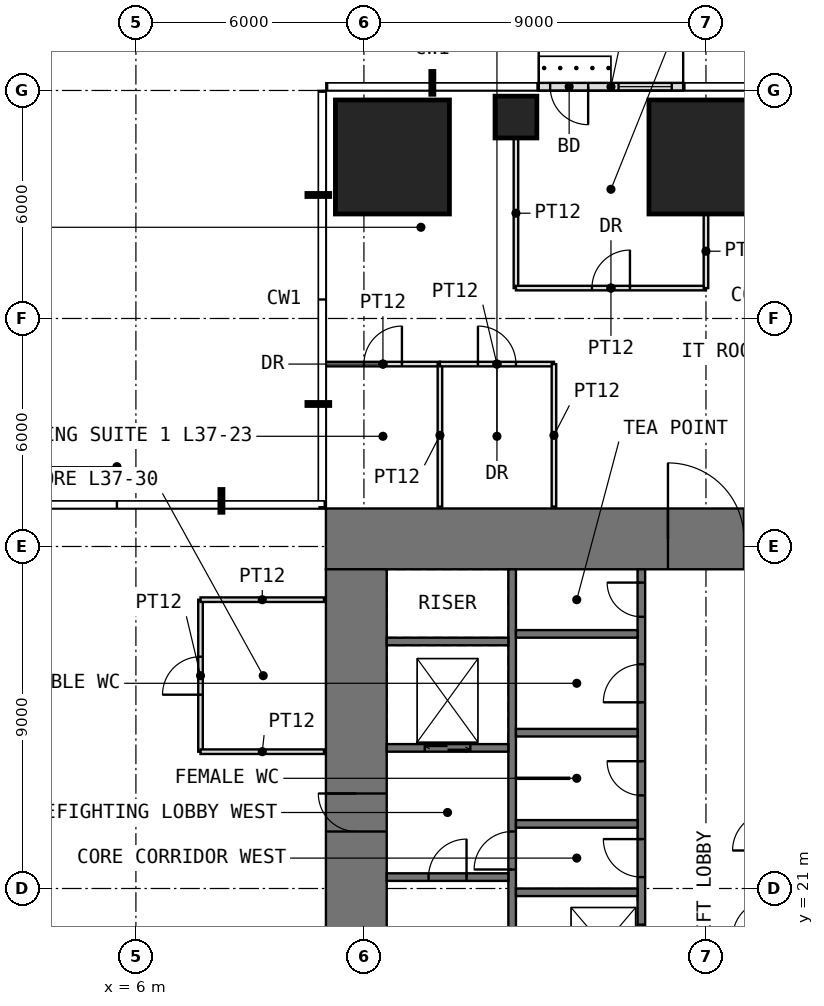
"""IFC4 building model, lengths in metres.
Left out: names, types, materials, properties, quantities, classifications, styles, units other than length and angle.
Written with IfcOpenShell. Run it as: python <this file> out.ifc"""

import sys

from ifc_helpers import new_model, si_unit, direction, frame, frame_2d, origin, origin_2d, place, context, subcontext, project, spatial, rectangle, extrude, element, fill, save


model = new_model("IFC4")
c1 = context("Model", 3, precision=1e-05, world=origin(), true_north=direction((0.0, 1.0)))
c2 = subcontext(c1, "Body", "Model", "MODEL_VIEW")
j1 = project(units=[si_unit("LENGTHUNIT", "METRE"), si_unit("PLANEANGLEUNIT", "RADIAN")], contexts=[c1])
p1 = place(None, origin())
s1 = spatial("IfcSite", under=j1, at=p1, CompositionType="ELEMENT")
p2 = place(p1, origin())
s2 = spatial("IfcBuilding", under=s1, at=p2, CompositionType="ELEMENT")
p3 = place(p2, frame((0.0, 0.0, 156.5)))
s3 = spatial("IfcBuildingStorey", under=s2, at=p3, CompositionType="ELEMENT", Elevation=156.5)
p4 = place(p3, frame((12.75, 40.25, 0.0), z_axis=(0.0, 0.0, 1.0), x_axis=(1.0, 0.0, 0.0)))
e1 = element("IfcColumn", 1, at=p4, inside=s3, PredefinedType="COLUMN", context=c2, shape_type="SweptSolid", body=[
    extrude(rectangle(XDim=3.0, YDim=3.0, at=origin_2d()), origin(), (0.0, 0.0, 1.0), 4.0),
])
p5 = place(p3, frame((16.0, 41.3, 0.0), z_axis=(0.0, 0.0, 1.0), x_axis=(1.0, 0.0, 0.0)))
e2 = element("IfcColumn", 2, at=p5, inside=s3, PredefinedType="COLUMN", context=c2, shape_type="SweptSolid", body=[
    extrude(rectangle(XDim=1.1, YDim=1.1, at=origin_2d()), origin(), (0.0, 0.0, 1.0), 4.0),
])
p6 = place(p3, frame((21.0, 40.25, 0.0), z_axis=(0.0, 0.0, 1.0), x_axis=(1.0, 0.0, 0.0)))
e3 = element("IfcColumn", 3, at=p6, inside=s3, PredefinedType="COLUMN", context=c2, shape_type="SweptSolid", body=[
    extrude(rectangle(XDim=3.0, YDim=3.0, at=origin_2d()), origin(), (0.0, 0.0, 1.0), 4.0),
])
p7 = place(p3, frame((20.4, 42.1, 0.0), z_axis=(0.0, 0.0, 1.0), x_axis=(-1.0, 0.0, 0.0)))
e4 = element("IfcWall", 4, at=p7, inside=s3, PredefinedType="USERDEFINED", context=c2, shape_type="SweptSolid", body=[
    extrude(rectangle(XDim=3.8, YDim=0.2, at=frame_2d((1.9, 0.0))), origin(), (0.0, 0.0, 1.0), 3.55),
])
p8 = place(p7, frame((2.5, 0.0, 0.0)))
e5 = element("IfcOpeningElement", 5, at=p8, cuts=e4, PredefinedType="OPENING", context=c2, shape_type="SweptSolid", body=[
    extrude(rectangle(XDim=1.0, YDim=2.4, at=frame_2d((0.5, 1.2))), frame((0.0, 0.11, 0.0), z_axis=(0.0, -1.0, 0.0), x_axis=(1.0, 0.0, 0.0)), (0.0, 0.0, 1.0), 0.22),
])
p9 = place(p7, frame((0.3, 0.0, 0.3)))
e6 = element("IfcOpeningElement", 6, at=p9, cuts=e4, PredefinedType="OPENING", context=c2, shape_type="SweptSolid", body=[
    extrude(rectangle(XDim=1.4, YDim=2.7, at=frame_2d((0.7, 1.35))), frame((0.0, 0.11, 0.0), z_axis=(0.0, -1.0, 0.0), x_axis=(1.0, 0.0, 0.0)), (0.0, 0.0, 1.0), 0.22),
])
p10 = place(p3, frame((11.0, 30.2, -0.05), z_axis=(0.0, 0.0, 1.0), x_axis=(1.0, 0.0, 0.0)))
e7 = element("IfcWall", 7, at=p10, inside=s3, PredefinedType="SHEAR", context=c2, shape_type="SweptSolid", body=[
    extrude(rectangle(XDim=20.0, YDim=1.6, at=frame_2d((10.0, 0.0))), origin(), (0.0, 0.0, 1.0), 3.8),
])
p11 = place(p10, frame((9.0, 0.0, 0.05)))
e8 = element("IfcOpeningElement", 8, at=p11, cuts=e7, PredefinedType="OPENING", context=c2, shape_type="SweptSolid", body=[
    extrude(rectangle(XDim=2.0, YDim=2.2, at=frame_2d((1.0, 1.1))), frame((0.0, 0.81, 0.0), z_axis=(0.0, -1.0, 0.0), x_axis=(1.0, 0.0, 0.0)), (0.0, 0.0, 1.0), 1.62),
])
p12 = place(p3, frame((11.8, 12.6, -0.05), z_axis=(0.0, 0.0, 1.0), x_axis=(0.0, 1.0, 0.0)))
e9 = element("IfcWall", 9, at=p12, inside=s3, PredefinedType="SHEAR", context=c2, shape_type="SweptSolid", body=[
    extrude(rectangle(XDim=16.8, YDim=1.6, at=frame_2d((8.4, 0.0))), origin(), (0.0, 0.0, 1.0), 3.8),
])
p13 = place(p12, frame((9.9, 0.0, 0.05)))
e10 = element("IfcOpeningElement", 10, at=p13, cuts=e9, PredefinedType="OPENING", context=c2, shape_type="SweptSolid", body=[
    extrude(rectangle(XDim=1.0, YDim=2.2, at=frame_2d((0.5, 1.1))), frame((0.0, 0.81, 0.0), z_axis=(0.0, -1.0, 0.0), x_axis=(1.0, 0.0, 0.0)), (0.0, 0.0, 1.0), 1.62),
])
p14 = place(p3, frame((15.9, 12.6, -0.05), z_axis=(0.0, 0.0, 1.0), x_axis=(0.0, 1.0, 0.0)))
e11 = element("IfcWall", 11, at=p14, inside=s3, PredefinedType="SHEAR", context=c2, shape_type="SweptSolid", body=[
    extrude(rectangle(XDim=16.8, YDim=0.2, at=frame_2d((8.4, 0.0))), origin(), (0.0, 0.0, 1.0), 3.8),
])
p15 = place(p14, frame((8.9, 0.0, 0.05)))
e12 = element("IfcOpeningElement", 12, at=p15, cuts=e11, PredefinedType="OPENING", context=c2, shape_type="SweptSolid", body=[
    extrude(rectangle(XDim=1.0, YDim=2.2, at=frame_2d((0.5, 1.1))), frame((0.0, 0.11, 0.0), z_axis=(0.0, -1.0, 0.0), x_axis=(1.0, 0.0, 0.0)), (0.0, 0.0, 1.0), 0.22),
])
p16 = place(p3, frame((19.3, 12.6, -0.05), z_axis=(0.0, 0.0, 1.0), x_axis=(0.0, 1.0, 0.0)))
e13 = element("IfcWall", 13, at=p16, inside=s3, PredefinedType="SHEAR", context=c2, shape_type="SweptSolid", body=[
    extrude(rectangle(XDim=16.8, YDim=0.2, at=frame_2d((8.4, 0.0))), origin(), (0.0, 0.0, 1.0), 3.8),
])
p17 = place(p16, frame((8.7, 0.0, 0.05)))
e14 = element("IfcOpeningElement", 14, at=p17, cuts=e13, PredefinedType="OPENING", context=c2, shape_type="SweptSolid", body=[
    extrude(rectangle(XDim=1.0, YDim=2.2, at=frame_2d((0.5, 1.1))), frame((0.0, 0.11, 0.0), z_axis=(0.0, -1.0, 0.0), x_axis=(1.0, 0.0, 0.0)), (0.0, 0.0, 1.0), 0.22),
])
p18 = place(p16, frame((10.85, 0.0, 0.05)))
e15 = element("IfcOpeningElement", 15, at=p18, cuts=e13, PredefinedType="OPENING", context=c2, shape_type="SweptSolid", body=[
    extrude(rectangle(XDim=0.9, YDim=2.2, at=frame_2d((0.45, 1.1))), frame((0.0, 0.11, 0.0), z_axis=(0.0, -1.0, 0.0), x_axis=(1.0, 0.0, 0.0)), (0.0, 0.0, 1.0), 0.22),
])
p19 = place(p16, frame((13.3, 0.0, 0.05)))
e16 = element("IfcOpeningElement", 16, at=p19, cuts=e13, PredefinedType="OPENING", context=c2, shape_type="SweptSolid", body=[
    extrude(rectangle(XDim=1.0, YDim=2.2, at=frame_2d((0.5, 1.1))), frame((0.0, 0.11, 0.0), z_axis=(0.0, -1.0, 0.0), x_axis=(1.0, 0.0, 0.0)), (0.0, 0.0, 1.0), 0.22),
])
p20 = place(p16, frame((15.55, 0.0, 0.05)))
e17 = element("IfcOpeningElement", 17, at=p20, cuts=e13, PredefinedType="OPENING", context=c2, shape_type="SweptSolid", body=[
    extrude(rectangle(XDim=0.9, YDim=2.2, at=frame_2d((0.45, 1.1))), frame((0.0, 0.11, 0.0), z_axis=(0.0, -1.0, 0.0), x_axis=(1.0, 0.0, 0.0)), (0.0, 0.0, 1.0), 0.22),
])
p21 = place(p16, frame((0.75, 0.0, 0.05)))
e18 = element("IfcOpeningElement", 18, at=p21, cuts=e13, PredefinedType="OPENING", context=c2, shape_type="SweptSolid", body=[
    extrude(rectangle(XDim=1.1, YDim=2.2, at=frame_2d((0.55, 1.1))), frame((0.0, 0.11, 0.0), z_axis=(0.0, -1.0, 0.0), x_axis=(1.0, 0.0, 0.0)), (0.0, 0.0, 1.0), 0.22),
])
p22 = place(p16, frame((3.55, 0.0, 0.05)))
e19 = element("IfcOpeningElement", 19, at=p22, cuts=e13, PredefinedType="OPENING", context=c2, shape_type="SweptSolid", body=[
    extrude(rectangle(XDim=1.1, YDim=2.2, at=frame_2d((0.55, 1.1))), frame((0.0, 0.11, 0.0), z_axis=(0.0, -1.0, 0.0), x_axis=(1.0, 0.0, 0.0)), (0.0, 0.0, 1.0), 0.22),
])
p23 = place(p16, frame((6.35, 0.0, 0.05)))
e20 = element("IfcOpeningElement", 20, at=p23, cuts=e13, PredefinedType="OPENING", context=c2, shape_type="SweptSolid", body=[
    extrude(rectangle(XDim=1.1, YDim=2.2, at=frame_2d((0.55, 1.1))), frame((0.0, 0.11, 0.0), z_axis=(0.0, -1.0, 0.0), x_axis=(1.0, 0.0, 0.0)), (0.0, 0.0, 1.0), 0.22),
])
p24 = place(p3, frame((12.6, 21.3, -0.05), z_axis=(0.0, 0.0, 1.0), x_axis=(1.0, 0.0, 0.0)))
e21 = element("IfcWall", 21, at=p24, inside=s3, PredefinedType="SHEAR", context=c2, shape_type="SweptSolid", body=[
    extrude(rectangle(XDim=3.2, YDim=0.2, at=frame_2d((1.6, 0.0))), origin(), (0.0, 0.0, 1.0), 3.8),
])
p25 = place(p24, frame((1.1, 0.0, 0.05)))
e22 = element("IfcOpeningElement", 22, at=p25, cuts=e21, PredefinedType="OPENING", context=c2, shape_type="SweptSolid", body=[
    extrude(rectangle(XDim=1.0, YDim=2.2, at=frame_2d((0.5, 1.1))), frame((0.0, 0.11, 0.0), z_axis=(0.0, -1.0, 0.0), x_axis=(1.0, 0.0, 0.0)), (0.0, 0.0, 1.0), 0.22),
])
p26 = place(p3, frame((12.6, 24.7, -0.05), z_axis=(0.0, 0.0, 1.0), x_axis=(1.0, 0.0, 0.0)))
e23 = element("IfcWall", 23, at=p26, inside=s3, PredefinedType="SHEAR", context=c2, shape_type="SweptSolid", body=[
    extrude(rectangle(XDim=3.2, YDim=0.2, at=frame_2d((1.6, 0.0))), origin(), (0.0, 0.0, 1.0), 3.8),
])
p27 = place(p26, frame((1.0, 0.0, 0.05)))
e24 = element("IfcOpeningElement", 24, at=p27, cuts=e23, PredefinedType="OPENING", context=c2, shape_type="SweptSolid", body=[
    extrude(rectangle(XDim=1.2, YDim=2.2, at=frame_2d((0.6, 1.1))), frame((0.0, 0.11, 0.0), z_axis=(0.0, -1.0, 0.0), x_axis=(1.0, 0.0, 0.0)), (0.0, 0.0, 1.0), 0.22),
])
for number, where, z_axis, x_axis in (
    (25, (12.6, 27.5, -0.05), (0.0, 0.0, 1.0), (1.0, 0.0, 0.0)),
    (26, (16.0, 20.9, -0.05), (0.0, 0.0, 1.0), (1.0, 0.0, 0.0)),
    (27, (16.0, 22.7, -0.05), (0.0, 0.0, 1.0), (1.0, 0.0, 0.0)),
    (28, (16.0, 25.1, -0.05), (0.0, 0.0, 1.0), (1.0, 0.0, 0.0)),
    (29, (16.0, 27.7, -0.05), (0.0, 0.0, 1.0), (1.0, 0.0, 0.0)),
):
    element("IfcWall", number, at=place(p3, frame(where, z_axis=z_axis, x_axis=x_axis)), inside=s3, PredefinedType="SHEAR", context=c2, shape_type="SweptSolid", body=[
        extrude(rectangle(XDim=3.2, YDim=0.2, at=frame_2d((1.6, 0.0))), origin(), (0.0, 0.0, 1.0), 3.8),
    ])
p28 = place(p3, frame((16.0, 23.9, 0.0), z_axis=(0.0, 0.0, 1.0), x_axis=(1.0, 0.0, 0.0)))
e30 = element("IfcWall", 30, at=p28, inside=s3, PredefinedType="PARTITIONING", context=c2, shape_type="SweptSolid", body=[
    extrude(rectangle(XDim=1.4, YDim=0.03, at=frame_2d((0.7, 0.0))), origin(), (0.0, 0.0, 1.0), 3.55),
])
p29 = place(p3, frame((7.7, 24.6, 0.0), z_axis=(0.0, 0.0, 1.0), x_axis=(0.0, 1.0, 0.0)))
e31 = element("IfcWall", 31, at=p29, inside=s3, PredefinedType="PARTITIONING", context=c2, shape_type="SweptSolid", body=[
    extrude(rectangle(XDim=4.0, YDim=0.12, at=frame_2d((2.0, 0.0))), origin(), (0.0, 0.0, 1.0), 3.55),
])
p30 = place(p29, frame((1.5, 0.0, 0.0)))
e32 = element("IfcOpeningElement", 32, at=p30, cuts=e31, PredefinedType="OPENING", context=c2, shape_type="SweptSolid", body=[
    extrude(rectangle(XDim=1.0, YDim=2.2, at=frame_2d((0.5, 1.1))), frame((0.0, 0.07, 0.0), z_axis=(0.0, -1.0, 0.0), x_axis=(1.0, 0.0, 0.0)), (0.0, 0.0, 1.0), 0.14),
])
for number, where, z_axis, x_axis in (
    (33, (7.7, 24.6, 0.0), (0.0, 0.0, 1.0), (1.0, 0.0, 0.0)),
    (34, (7.7, 28.6, 0.0), (0.0, 0.0, 1.0), (1.0, 0.0, 0.0)),
):
    element("IfcWall", number, at=place(p3, frame(where, z_axis=z_axis, x_axis=x_axis)), inside=s3, PredefinedType="PARTITIONING", context=c2, shape_type="SweptSolid", body=[
        extrude(rectangle(XDim=3.25, YDim=0.12, at=frame_2d((1.625, 0.0))), origin(), (0.0, 0.0, 1.0), 3.55),
    ])
p31 = place(p3, frame((11.0, 34.8, 0.0), z_axis=(0.0, 0.0, 1.0), x_axis=(1.0, 0.0, 0.0)))
e35 = element("IfcWall", 35, at=p31, inside=s3, PredefinedType="PARTITIONING", context=c2, shape_type="SweptSolid", body=[
    extrude(rectangle(XDim=3.0, YDim=0.12, at=frame_2d((1.5, 0.0))), origin(), (0.0, 0.0, 1.0), 3.55),
])
p32 = place(p31, frame((1.0, 0.0, 0.0)))
e36 = element("IfcOpeningElement", 36, at=p32, cuts=e35, PredefinedType="OPENING", context=c2, shape_type="SweptSolid", body=[
    extrude(rectangle(XDim=1.0, YDim=2.2, at=frame_2d((0.5, 1.1))), frame((0.0, 0.07, 0.0), z_axis=(0.0, -1.0, 0.0), x_axis=(1.0, 0.0, 0.0)), (0.0, 0.0, 1.0), 0.14),
])
p33 = place(p3, frame((14.0, 31.05, 0.0), z_axis=(0.0, 0.0, 1.0), x_axis=(0.0, 1.0, 0.0)))
e37 = element("IfcWall", 37, at=p33, inside=s3, PredefinedType="PARTITIONING", context=c2, shape_type="SweptSolid", body=[
    extrude(rectangle(XDim=3.75, YDim=0.12, at=frame_2d((1.875, 0.0))), origin(), (0.0, 0.0, 1.0), 3.55),
])
p34 = place(p3, frame((14.0, 34.8, 0.0), z_axis=(0.0, 0.0, 1.0), x_axis=(1.0, 0.0, 0.0)))
e38 = element("IfcWall", 38, at=p34, inside=s3, PredefinedType="PARTITIONING", context=c2, shape_type="SweptSolid", body=[
    extrude(rectangle(XDim=3.0, YDim=0.12, at=frame_2d((1.5, 0.0))), origin(), (0.0, 0.0, 1.0), 3.55),
])
p35 = place(p34, frame((1.0, 0.0, 0.0)))
e39 = element("IfcOpeningElement", 39, at=p35, cuts=e38, PredefinedType="OPENING", context=c2, shape_type="SweptSolid", body=[
    extrude(rectangle(XDim=1.0, YDim=2.2, at=frame_2d((0.5, 1.1))), frame((0.0, 0.07, 0.0), z_axis=(0.0, -1.0, 0.0), x_axis=(1.0, 0.0, 0.0)), (0.0, 0.0, 1.0), 0.14),
])
p36 = place(p3, frame((16.0, 36.8, 0.0), z_axis=(0.0, 0.0, 1.0), x_axis=(0.0, 1.0, 0.0)))
e40 = element("IfcWall", 40, at=p36, inside=s3, PredefinedType="PARTITIONING", context=c2, shape_type="SweptSolid", body=[
    extrude(rectangle(XDim=3.94, YDim=0.12, at=frame_2d((1.97, 0.0))), origin(), (0.0, 0.0, 1.0), 2.736),
])
p37 = place(p3, frame((16.0, 36.8, 0.0), z_axis=(0.0, 0.0, 1.0), x_axis=(1.0, 0.0, 0.0)))
e41 = element("IfcWall", 41, at=p37, inside=s3, PredefinedType="PARTITIONING", context=c2, shape_type="SweptSolid", body=[
    extrude(rectangle(XDim=5.0, YDim=0.12, at=frame_2d((2.5, 0.0))), origin(), (0.0, 0.0, 1.0), 3.55),
])
p38 = place(p37, frame((2.0, 0.0, 0.0)))
e42 = element("IfcOpeningElement", 42, at=p38, cuts=e41, PredefinedType="OPENING", context=c2, shape_type="SweptSolid", body=[
    extrude(rectangle(XDim=1.0, YDim=2.2, at=frame_2d((0.5, 1.1))), frame((0.0, 0.07, 0.0), z_axis=(0.0, -1.0, 0.0), x_axis=(1.0, 0.0, 0.0)), (0.0, 0.0, 1.0), 0.14),
])
p39 = place(p3, frame((17.0, 31.05, 0.0), z_axis=(0.0, 0.0, 1.0), x_axis=(0.0, 1.0, 0.0)))
e43 = element("IfcWall", 43, at=p39, inside=s3, PredefinedType="PARTITIONING", context=c2, shape_type="SweptSolid", body=[
    extrude(rectangle(XDim=3.75, YDim=0.12, at=frame_2d((1.875, 0.0))), origin(), (0.0, 0.0, 1.0), 3.55),
])
p40 = place(p3, frame((21.0, 36.8, 0.0), z_axis=(0.0, 0.0, 1.0), x_axis=(0.0, 1.0, 0.0)))
e44 = element("IfcWall", 44, at=p40, inside=s3, PredefinedType="PARTITIONING", context=c2, shape_type="SweptSolid", body=[
    extrude(rectangle(XDim=1.94, YDim=0.12, at=frame_2d((0.97, 0.0))), origin(), (0.0, 0.0, 1.0), 3.55),
])
p41 = place(p8, origin())
e45 = element("IfcDoor", 45, at=p41, inside=s3, OperationType="SINGLE_SWING_LEFT", PredefinedType="DOOR", context=c2, shape_type="SweptSolid", body=[
    extrude(rectangle(XDim=1.0, YDim=2.4, at=frame_2d((0.5, 1.2))), frame((0.0, 0.025, 0.0), z_axis=(0.0, -1.0, 0.0), x_axis=(1.0, 0.0, 0.0)), (0.0, 0.0, 1.0), 0.05),
])
fill(e5, e45)
p42 = place(p9, origin())
e46 = element("IfcWindow", 46, at=p42, inside=s3, PartitioningType="SINGLE_PANEL", PredefinedType="WINDOW", context=c2, shape_type="SweptSolid", body=[
    extrude(rectangle(XDim=1.4, YDim=2.7, at=frame_2d((0.7, 1.35))), frame((0.0, 0.03, 0.0), z_axis=(0.0, -1.0, 0.0), x_axis=(1.0, 0.0, 0.0)), (0.0, 0.0, 1.0), 0.06),
])
fill(e6, e46)
p43 = place(p11, origin())
e47 = element("IfcDoor", 47, at=p43, inside=s3, OperationType="DOUBLE_DOOR_SINGLE_SWING", PredefinedType="DOOR", context=c2, shape_type="SweptSolid", body=[
    extrude(rectangle(XDim=2.0, YDim=2.2, at=frame_2d((1.0, 1.1))), frame((0.0, 0.025, 0.0), z_axis=(0.0, -1.0, 0.0), x_axis=(1.0, 0.0, 0.0)), (0.0, 0.0, 1.0), 0.05),
])
fill(e8, e47)
p44 = place(p13, origin())
e48 = element("IfcDoor", 48, at=p44, inside=s3, OperationType="SINGLE_SWING_RIGHT", PredefinedType="DOOR", context=c2, shape_type="SweptSolid", body=[
    extrude(rectangle(XDim=1.0, YDim=2.2, at=frame_2d((0.5, 1.1))), frame((0.0, 0.025, 0.0), z_axis=(0.0, -1.0, 0.0), x_axis=(1.0, 0.0, 0.0)), (0.0, 0.0, 1.0), 0.05),
])
fill(e10, e48)
p45 = place(p25, origin())
e49 = element("IfcDoor", 49, at=p45, inside=s3, OperationType="SINGLE_SWING_RIGHT", PredefinedType="DOOR", context=c2, shape_type="SweptSolid", body=[
    extrude(rectangle(XDim=1.0, YDim=2.2, at=frame_2d((0.5, 1.1))), frame((0.0, 0.025, 0.0), z_axis=(0.0, -1.0, 0.0), x_axis=(1.0, 0.0, 0.0)), (0.0, 0.0, 1.0), 0.05),
])
fill(e22, e49)
p46 = place(p15, origin())
e50 = element("IfcDoor", 50, at=p46, inside=s3, OperationType="SINGLE_SWING_LEFT", PredefinedType="DOOR", context=c2, shape_type="SweptSolid", body=[
    extrude(rectangle(XDim=1.0, YDim=2.2, at=frame_2d((0.5, 1.1))), frame((0.0, 0.025, 0.0), z_axis=(0.0, -1.0, 0.0), x_axis=(1.0, 0.0, 0.0)), (0.0, 0.0, 1.0), 0.05),
])
fill(e12, e50)
p47 = place(p17, origin())
e51 = element("IfcDoor", 51, at=p47, inside=s3, OperationType="SINGLE_SWING_RIGHT", PredefinedType="DOOR", context=c2, shape_type="SweptSolid", body=[
    extrude(rectangle(XDim=1.0, YDim=2.2, at=frame_2d((0.5, 1.1))), frame((0.0, 0.025, 0.0), z_axis=(0.0, -1.0, 0.0), x_axis=(1.0, 0.0, 0.0)), (0.0, 0.0, 1.0), 0.05),
])
fill(e14, e51)
p48 = place(p18, origin())
e52 = element("IfcDoor", 52, at=p48, inside=s3, OperationType="SINGLE_SWING_RIGHT", PredefinedType="DOOR", context=c2, shape_type="SweptSolid", body=[
    extrude(rectangle(XDim=0.9, YDim=2.2, at=frame_2d((0.45, 1.1))), frame((0.0, 0.025, 0.0), z_axis=(0.0, -1.0, 0.0), x_axis=(1.0, 0.0, 0.0)), (0.0, 0.0, 1.0), 0.05),
])
fill(e15, e52)
p49 = place(p19, origin())
e53 = element("IfcDoor", 53, at=p49, inside=s3, OperationType="SINGLE_SWING_LEFT", PredefinedType="DOOR", context=c2, shape_type="SweptSolid", body=[
    extrude(rectangle(XDim=1.0, YDim=2.2, at=frame_2d((0.5, 1.1))), frame((0.0, 0.025, 0.0), z_axis=(0.0, -1.0, 0.0), x_axis=(1.0, 0.0, 0.0)), (0.0, 0.0, 1.0), 0.05),
])
fill(e16, e53)
p50 = place(p20, origin())
e54 = element("IfcDoor", 54, at=p50, inside=s3, OperationType="SINGLE_SWING_RIGHT", PredefinedType="DOOR", context=c2, shape_type="SweptSolid", body=[
    extrude(rectangle(XDim=0.9, YDim=2.2, at=frame_2d((0.45, 1.1))), frame((0.0, 0.025, 0.0), z_axis=(0.0, -1.0, 0.0), x_axis=(1.0, 0.0, 0.0)), (0.0, 0.0, 1.0), 0.05),
])
fill(e17, e54)
p51 = place(p32, origin())
e55 = element("IfcDoor", 55, at=p51, inside=s3, OperationType="SINGLE_SWING_RIGHT", PredefinedType="DOOR", context=c2, shape_type="SweptSolid", body=[
    extrude(rectangle(XDim=1.0, YDim=2.2, at=frame_2d((0.5, 1.1))), frame((0.0, 0.025, 0.0), z_axis=(0.0, -1.0, 0.0), x_axis=(1.0, 0.0, 0.0)), (0.0, 0.0, 1.0), 0.05),
])
fill(e36, e55)
p52 = place(p35, origin())
e56 = element("IfcDoor", 56, at=p52, inside=s3, OperationType="SINGLE_SWING_LEFT", PredefinedType="DOOR", context=c2, shape_type="SweptSolid", body=[
    extrude(rectangle(XDim=1.0, YDim=2.2, at=frame_2d((0.5, 1.1))), frame((0.0, 0.025, 0.0), z_axis=(0.0, -1.0, 0.0), x_axis=(1.0, 0.0, 0.0)), (0.0, 0.0, 1.0), 0.05),
])
fill(e39, e56)
p53 = place(p38, origin())
e57 = element("IfcDoor", 57, at=p53, inside=s3, OperationType="SINGLE_SWING_RIGHT", PredefinedType="DOOR", context=c2, shape_type="SweptSolid", body=[
    extrude(rectangle(XDim=1.0, YDim=2.2, at=frame_2d((0.5, 1.1))), frame((0.0, 0.025, 0.0), z_axis=(0.0, -1.0, 0.0), x_axis=(1.0, 0.0, 0.0)), (0.0, 0.0, 1.0), 0.05),
])
fill(e42, e57)
p54 = place(p30, origin())
e58 = element("IfcDoor", 58, at=p54, inside=s3, OperationType="SINGLE_SWING_LEFT", PredefinedType="DOOR", context=c2, shape_type="SweptSolid", body=[
    extrude(rectangle(XDim=1.0, YDim=2.2, at=frame_2d((0.5, 1.1))), frame((0.0, 0.025, 0.0), z_axis=(0.0, -1.0, 0.0), x_axis=(1.0, 0.0, 0.0)), (0.0, 0.0, 1.0), 0.05),
])
fill(e32, e58)
p55 = place(p23, origin())
e59 = element("IfcDoor", 59, at=p55, inside=s3, OperationType="DOUBLE_DOOR_SLIDING", PredefinedType="DOOR", context=c2, shape_type="SweptSolid", body=[
    extrude(rectangle(XDim=1.1, YDim=2.2, at=frame_2d((0.55, 1.1))), frame((0.0, 0.025, 0.0), z_axis=(0.0, -1.0, 0.0), x_axis=(1.0, 0.0, 0.0)), (0.0, 0.0, 1.0), 0.05),
])
fill(e20, e59)
p56 = place(p27, origin())
e60 = element("IfcDoor", 60, at=p56, inside=s3, OperationType="DOUBLE_DOOR_SLIDING", PredefinedType="DOOR", context=c2, shape_type="SweptSolid", body=[
    extrude(rectangle(XDim=1.2, YDim=2.2, at=frame_2d((0.6, 1.1))), frame((0.0, 0.025, 0.0), z_axis=(0.0, -1.0, 0.0), x_axis=(1.0, 0.0, 0.0)), (0.0, 0.0, 1.0), 0.05),
])
fill(e24, e60)
save(model, sys.argv[1])
